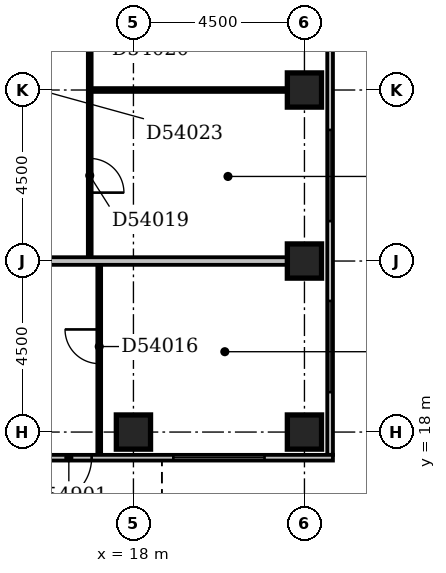
"""IFC4 building model, lengths in metres.
Left out: names, types, materials, properties, quantities, classifications, styles, units other than length and angle.
Written with IfcOpenShell. Run it as: python <this file> out.ifc"""

import sys

from ifc_helpers import new_model, si_unit, direction, frame, frame_2d, origin, origin_2d, place, context, subcontext, project, spatial, rectangle, extrude, element, fill, save


model = new_model("IFC4")
c1 = context("Model", 3, precision=1e-05, world=origin(), true_north=direction((0.0, 1.0)))
c2 = subcontext(c1, "Body", "Model", "MODEL_VIEW")
j1 = project(units=[si_unit("LENGTHUNIT", "METRE"), si_unit("PLANEANGLEUNIT", "RADIAN")], contexts=[c1])
p1 = place(None, origin())
s1 = spatial("IfcSite", under=j1, at=p1, CompositionType="ELEMENT")
p2 = place(p1, origin())
s2 = spatial("IfcBuilding", under=s1, at=p2, CompositionType="ELEMENT")
p3 = place(p2, frame((0.0, 0.0, 211.4)))
s3 = spatial("IfcBuildingStorey", under=s2, at=p3, CompositionType="ELEMENT", Elevation=211.4)
for number, where, z_axis, x_axis in (
    (1, (18.0, 18.0, -0.35), (0.0, 0.0, 1.0), (1.0, 0.0, 0.0)),
    (2, (22.5, 18.0, -0.35), (0.0, 0.0, 1.0), (1.0, 0.0, 0.0)),
    (3, (22.5, 22.5, -0.35), (0.0, 0.0, 1.0), (1.0, 0.0, 0.0)),
    (4, (22.5, 27.0, -0.35), (0.0, 0.0, 1.0), (1.0, 0.0, 0.0)),
):
    element("IfcColumn", number, at=place(p3, frame(where, z_axis=z_axis, x_axis=x_axis)), inside=s3, PredefinedType="COLUMN", context=c2, shape_type="SweptSolid", body=[
        extrude(rectangle(XDim=0.9, YDim=0.9, at=origin_2d()), origin(), (0.0, 0.0, 1.0), 3.65),
    ])
p4 = place(p3, frame((3.9, 17.325, 0.0), z_axis=(0.0, 0.0, 1.0), x_axis=(1.0, 0.0, 0.0)))
e5 = element("IfcWall", 5, at=p4, inside=s3, PredefinedType="STANDARD", context=c2, shape_type="SweptSolid", body=[
    extrude(rectangle(XDim=19.35, YDim=0.15, at=frame_2d((9.675, 0.0))), origin(), (0.0, 0.0, 1.0), 2.7),
])
p5 = place(p4, frame((11.8, 0.0, 0.0)))
e6 = element("IfcOpeningElement", 6, at=p5, cuts=e5, PredefinedType="OPENING", context=c2, shape_type="SweptSolid", body=[
    extrude(rectangle(XDim=1.2, YDim=2.4, at=frame_2d((0.6, 1.2))), frame((0.0, 0.087, 0.0), z_axis=(0.0, -1.0, 0.0), x_axis=(1.0, 0.0, 0.0)), (0.0, 0.0, 1.0), 0.174),
])
p6 = place(p4, frame((15.15, 0.0, 0.6)))
e7 = element("IfcOpeningElement", 7, at=p6, cuts=e5, PredefinedType="OPENING", context=c2, shape_type="SweptSolid", body=[
    extrude(rectangle(XDim=2.4, YDim=1.8, at=frame_2d((1.2, 0.9))), frame((0.0, 0.087, 0.0), z_axis=(0.0, -1.0, 0.0), x_axis=(1.0, 0.0, 0.0)), (0.0, 0.0, 1.0), 0.174),
])
p7 = place(p3, frame((23.175, 17.4, 0.0), z_axis=(0.0, 0.0, 1.0), x_axis=(0.0, 1.0, 0.0)))
e8 = element("IfcWall", 8, at=p7, inside=s3, PredefinedType="STANDARD", context=c2, shape_type="SweptSolid", body=[
    extrude(rectangle(XDim=17.85, YDim=0.15, at=frame_2d((8.925, 0.0))), origin(), (0.0, 0.0, 1.0), 2.7),
])
p8 = place(p7, frame((1.65, 0.0, 0.6)))
e9 = element("IfcOpeningElement", 9, at=p8, cuts=e8, PredefinedType="OPENING", context=c2, shape_type="SweptSolid", body=[
    extrude(rectangle(XDim=2.4, YDim=1.8, at=frame_2d((1.2, 0.9))), frame((0.0, 0.087, 0.0), z_axis=(0.0, -1.0, 0.0), x_axis=(1.0, 0.0, 0.0)), (0.0, 0.0, 1.0), 0.174),
])
p9 = place(p7, frame((6.15, 0.0, 0.6)))
e10 = element("IfcOpeningElement", 10, at=p9, cuts=e8, PredefinedType="OPENING", context=c2, shape_type="SweptSolid", body=[
    extrude(rectangle(XDim=2.4, YDim=1.8, at=frame_2d((1.2, 0.9))), frame((0.0, 0.087, 0.0), z_axis=(0.0, -1.0, 0.0), x_axis=(1.0, 0.0, 0.0)), (0.0, 0.0, 1.0), 0.174),
])
p10 = place(p7, frame((10.65, 0.0, 0.6)))
e11 = element("IfcOpeningElement", 11, at=p10, cuts=e8, PredefinedType="OPENING", context=c2, shape_type="SweptSolid", body=[
    extrude(rectangle(XDim=2.4, YDim=1.8, at=frame_2d((1.2, 0.9))), frame((0.0, 0.087, 0.0), z_axis=(0.0, -1.0, 0.0), x_axis=(1.0, 0.0, 0.0)), (0.0, 0.0, 1.0), 0.174),
])
p11 = place(p7, frame((17.027, 0.0, 0.6)))
e12 = element("IfcOpeningElement", 12, at=p11, cuts=e8, PredefinedType="OPENING", context=c2, shape_type="SweptSolid", body=[
    extrude(rectangle(XDim=0.6, YDim=1.8, at=frame_2d((0.3, 0.9))), frame((0.0, 0.087, 0.0), z_axis=(0.0, -1.0, 0.0), x_axis=(1.0, 0.0, 0.0)), (0.0, 0.0, 1.0), 0.174),
])
p12 = place(p3, frame((17.1, 17.4, 0.0), z_axis=(0.0, 0.0, 1.0), x_axis=(0.0, 1.0, 0.0)))
e13 = element("IfcWall", 13, at=p12, inside=s3, PredefinedType="PARTITIONING", context=c2, shape_type="SweptSolid", body=[
    extrude(rectangle(XDim=5.0, YDim=0.1, at=frame_2d((2.5, 0.0))), origin(), (0.0, 0.0, 1.0), 3.3),
])
p13 = place(p12, frame((2.4, 0.0, 0.0)))
e14 = element("IfcOpeningElement", 14, at=p13, cuts=e13, PredefinedType="OPENING", context=c2, shape_type="SweptSolid", body=[
    extrude(rectangle(XDim=0.9, YDim=2.1, at=frame_2d((0.45, 1.05))), frame((0.0, 0.062, 0.0), z_axis=(0.0, -1.0, 0.0), x_axis=(1.0, 0.0, 0.0)), (0.0, 0.0, 1.0), 0.124),
])
p14 = place(p3, frame((9.1, 22.5, 0.0), z_axis=(0.0, 0.0, 1.0), x_axis=(1.0, 0.0, 0.0)))
e15 = element("IfcWall", 15, at=p14, inside=s3, PredefinedType="PARTITIONING", context=c2, shape_type="SweptSolid", body=[
    extrude(rectangle(XDim=12.95, YDim=0.2, at=frame_2d((6.475, 0.0))), origin(), (0.0, 0.0, 1.0), 3.3),
])
p15 = place(p3, frame((16.85, 22.6, 0.0), z_axis=(0.0, 0.0, 1.0), x_axis=(0.0, 1.0, 0.0)))
e16 = element("IfcWall", 16, at=p15, inside=s3, PredefinedType="PARTITIONING", context=c2, shape_type="SweptSolid", body=[
    extrude(rectangle(XDim=13.3, YDim=0.1, at=frame_2d((6.65, 0.0))), origin(), (0.0, 0.0, 1.0), 3.3),
])
p16 = place(p15, frame((1.7, 0.0, 0.0)))
e17 = element("IfcOpeningElement", 17, at=p16, cuts=e16, PredefinedType="OPENING", context=c2, shape_type="SweptSolid", body=[
    extrude(rectangle(XDim=0.9, YDim=2.1, at=frame_2d((0.45, 1.05))), frame((0.0, 0.062, 0.0), z_axis=(0.0, -1.0, 0.0), x_axis=(1.0, 0.0, 0.0)), (0.0, 0.0, 1.0), 0.124),
])
p17 = place(p15, frame((6.2, 0.0, 0.0)))
e18 = element("IfcOpeningElement", 18, at=p17, cuts=e16, PredefinedType="OPENING", context=c2, shape_type="SweptSolid", body=[
    extrude(rectangle(XDim=0.9, YDim=2.1, at=frame_2d((0.45, 1.05))), frame((0.0, 0.062, 0.0), z_axis=(0.0, -1.0, 0.0), x_axis=(1.0, 0.0, 0.0)), (0.0, 0.0, 1.0), 0.124),
])
p18 = place(p15, frame((10.7, 0.0, 0.0)))
e19 = element("IfcOpeningElement", 19, at=p18, cuts=e16, PredefinedType="OPENING", context=c2, shape_type="SweptSolid", body=[
    extrude(rectangle(XDim=0.9, YDim=2.1, at=frame_2d((0.45, 1.05))), frame((0.0, 0.062, 0.0), z_axis=(0.0, -1.0, 0.0), x_axis=(1.0, 0.0, 0.0)), (0.0, 0.0, 1.0), 0.124),
])
p19 = place(p3, frame((16.9, 27.0, 0.0), z_axis=(0.0, 0.0, 1.0), x_axis=(1.0, 0.0, 0.0)))
e20 = element("IfcWall", 20, at=p19, inside=s3, PredefinedType="PARTITIONING", context=c2, shape_type="SweptSolid", body=[
    extrude(rectangle(XDim=5.15, YDim=0.1, at=frame_2d((2.575, 0.0))), origin(), (0.0, 0.0, 1.0), 2.7),
])
p20 = place(p5, origin())
e21 = element("IfcDoor", 21, at=p20, inside=s3, OperationType="DOUBLE_DOOR_SINGLE_SWING", PredefinedType="DOOR", context=c2, shape_type="SweptSolid", body=[
    extrude(rectangle(XDim=1.2, YDim=2.4, at=frame_2d((0.6, 1.2))), frame((0.0, 0.025, 0.0), z_axis=(0.0, -1.0, 0.0), x_axis=(1.0, 0.0, 0.0)), (0.0, 0.0, 1.0), 0.05),
])
fill(e6, e21)
p21 = place(p6, origin())
e22 = element("IfcWindow", 22, at=p21, inside=s3, PartitioningType="SINGLE_PANEL", PredefinedType="WINDOW", context=c2, shape_type="SweptSolid", body=[
    extrude(rectangle(XDim=2.4, YDim=1.8, at=frame_2d((1.2, 0.9))), frame((0.0, 0.03, 0.0), z_axis=(0.0, -1.0, 0.0), x_axis=(1.0, 0.0, 0.0)), (0.0, 0.0, 1.0), 0.06),
])
fill(e7, e22)
p22 = place(p8, origin())
e23 = element("IfcWindow", 23, at=p22, inside=s3, PartitioningType="SINGLE_PANEL", PredefinedType="WINDOW", context=c2, shape_type="SweptSolid", body=[
    extrude(rectangle(XDim=2.4, YDim=1.8, at=frame_2d((1.2, 0.9))), frame((0.0, 0.03, 0.0), z_axis=(0.0, -1.0, 0.0), x_axis=(1.0, 0.0, 0.0)), (0.0, 0.0, 1.0), 0.06),
])
fill(e9, e23)
p23 = place(p9, origin())
e24 = element("IfcWindow", 24, at=p23, inside=s3, PartitioningType="SINGLE_PANEL", PredefinedType="WINDOW", context=c2, shape_type="SweptSolid", body=[
    extrude(rectangle(XDim=2.4, YDim=1.8, at=frame_2d((1.2, 0.9))), frame((0.0, 0.03, 0.0), z_axis=(0.0, -1.0, 0.0), x_axis=(1.0, 0.0, 0.0)), (0.0, 0.0, 1.0), 0.06),
])
fill(e10, e24)
p24 = place(p13, frame((0.9, 0.0, 0.0), z_axis=(0.0, 0.0, 1.0), x_axis=(-1.0, 0.0, 0.0)))
e25 = element("IfcDoor", 25, at=p24, inside=s3, OperationType="SINGLE_SWING_LEFT", PredefinedType="DOOR", context=c2, shape_type="SweptSolid", body=[
    extrude(rectangle(XDim=0.9, YDim=2.1, at=frame_2d((0.45, 1.05))), frame((0.0, 0.025, 0.0), z_axis=(0.0, -1.0, 0.0), x_axis=(1.0, 0.0, 0.0)), (0.0, 0.0, 1.0), 0.05),
])
fill(e14, e25)
p25 = place(p16, frame((0.9, 0.0, 0.0), z_axis=(0.0, 0.0, 1.0), x_axis=(-1.0, 0.0, 0.0)))
e26 = element("IfcDoor", 26, at=p25, inside=s3, OperationType="SINGLE_SWING_RIGHT", PredefinedType="DOOR", context=c2, shape_type="SweptSolid", body=[
    extrude(rectangle(XDim=0.9, YDim=2.1, at=frame_2d((0.45, 1.05))), frame((0.0, 0.025, 0.0), z_axis=(0.0, -1.0, 0.0), x_axis=(1.0, 0.0, 0.0)), (0.0, 0.0, 1.0), 0.05),
])
fill(e17, e26)
save(model, sys.argv[1])
